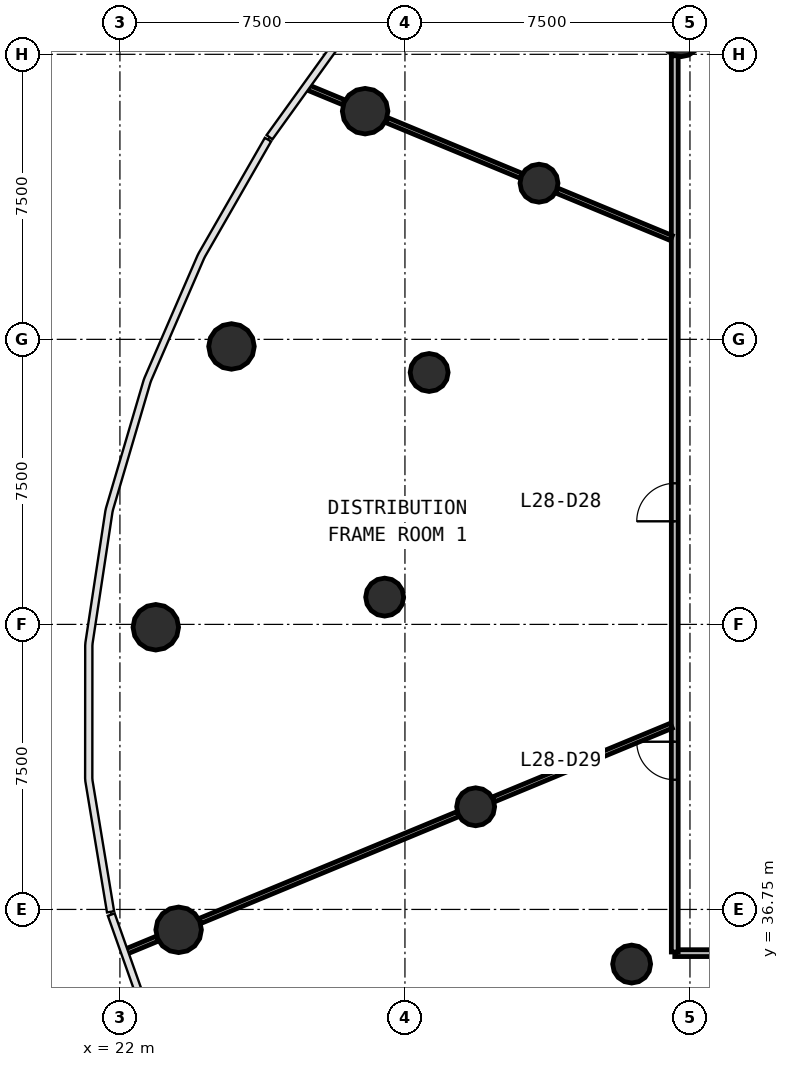
"""IFC4 building model, lengths in metres.
Left out: names, types, materials, properties, quantities, classifications, styles, units other than length and angle.
Written with IfcOpenShell. Run it as: python <this file> out.ifc"""

import sys

from ifc_helpers import new_model, si_unit, direction, frame, frame_2d, origin, origin_2d, place, context, subcontext, project, spatial, rectangle, circle, extrude, source, transform, mapped, element, fill, save


model = new_model("IFC4")
c1 = context("Model", 3, precision=1e-05, world=origin(), true_north=direction((0.0, 1.0)))
c2 = subcontext(c1, "Body", "Model", "MODEL_VIEW")
j1 = project(units=[si_unit("LENGTHUNIT", "METRE"), si_unit("PLANEANGLEUNIT", "RADIAN")], contexts=[c1])
p1 = place(None, origin())
s1 = spatial("IfcSite", under=j1, at=p1, CompositionType="ELEMENT")
p2 = place(p1, origin())
s2 = spatial("IfcBuilding", under=s1, at=p2, CompositionType="ELEMENT")
p3 = place(p2, frame((0.0, 0.0, 120.8)))
s3 = spatial("IfcBuildingStorey", under=s2, at=p3, CompositionType="ELEMENT", Elevation=120.8)
m1 = source(origin(), c2, "Body", "SweptSolid", [
    extrude(circle(Radius=0.6, at=origin_2d()), origin(), (0.0, 0.0, 1.0), 4.1),
])
for number, where, z_axis, x_axis in (
    (1, (28.452, 57.754, 0.0), (0.0, 0.0, 1.0), (1.0, 0.0, 0.0)),
    (2, (24.936, 51.563, 0.0), (0.0, 0.0, 1.0), (1.0, 0.0, 0.0)),
    (3, (22.944, 44.175, 0.0), (0.0, 0.0, 1.0), (1.0, 0.0, 0.0)),
    (4, (23.544, 36.213, 0.0), (0.0, 0.0, 1.0), (1.0, 0.0, 0.0)),
):
    element("IfcColumn", number, at=place(p3, frame(where, z_axis=z_axis, x_axis=x_axis)), inside=s3, PredefinedType="COLUMN", context=c2, shape_type="MappedRepresentation", body=[
        mapped(m1, transform((0.0, 0.0, 0.0), scale=1.0)),
    ])
m2 = source(origin(), c2, "Body", "SweptSolid", [
    extrude(circle(Radius=0.5, at=origin_2d()), origin(), (0.0, 0.0, 1.0), 4.1),
])
for number, where, z_axis, x_axis in (
    (5, (36.768, 59.688, 0.0), (0.0, 0.0, 1.0), (1.0, 0.0, 0.0)),
    (6, (33.028, 55.859, 0.0), (0.0, 0.0, 1.0), (1.0, 0.0, 0.0)),
    (7, (30.137, 50.878, 0.0), (0.0, 0.0, 1.0), (1.0, 0.0, 0.0)),
    (8, (28.966, 44.968, 0.0), (0.0, 0.0, 1.0), (1.0, 0.0, 0.0)),
    (9, (31.361, 39.451, 0.0), (0.0, 0.0, 1.0), (1.0, 0.0, 0.0)),
    (10, (35.465, 35.312, 0.0), (0.0, 0.0, 1.0), (1.0, 0.0, 0.0)),
):
    element("IfcColumn", number, at=place(p3, frame(where, z_axis=z_axis, x_axis=x_axis)), inside=s3, PredefinedType="COLUMN", context=c2, shape_type="MappedRepresentation", body=[
        mapped(m2, transform((0.0, 0.0, 0.0), scale=1.0)),
    ])
p4 = place(p3, frame((67.4, 35.6, 0.0), z_axis=(0.0, 0.0, 1.0), x_axis=(-1.0, 0.0, 0.0)))
e11 = element("IfcWall", 11, at=p4, inside=s3, PredefinedType="PARTITIONING", context=c2, shape_type="SweptSolid", body=[
    extrude(rectangle(XDim=30.8, YDim=0.18, at=frame_2d((15.4, 0.0))), origin(), (0.0, 0.0, 1.0), 2.9),
])
p5 = place(p4, frame((20.95, 0.0, 0.0)))
e12 = element("IfcOpeningElement", 12, at=p5, cuts=e11, PredefinedType="OPENING", context=c2, shape_type="SweptSolid", body=[
    extrude(rectangle(XDim=1.0, YDim=2.1, at=frame_2d((0.5, 1.05))), frame((0.0, 0.1, 0.0), z_axis=(0.0, -1.0, 0.0), x_axis=(1.0, 0.0, 0.0)), (0.0, 0.0, 1.0), 0.2),
])
p6 = place(p4, frame((14.95, 0.0, 0.0)))
e13 = element("IfcOpeningElement", 13, at=p6, cuts=e11, PredefinedType="OPENING", context=c2, shape_type="SweptSolid", body=[
    extrude(rectangle(XDim=1.0, YDim=2.1, at=frame_2d((0.5, 1.05))), frame((0.0, 0.1, 0.0), z_axis=(0.0, -1.0, 0.0), x_axis=(1.0, 0.0, 0.0)), (0.0, 0.0, 1.0), 0.2),
])
p7 = place(p4, frame((12.55, 0.0, 0.0)))
e14 = element("IfcOpeningElement", 14, at=p7, cuts=e11, PredefinedType="OPENING", context=c2, shape_type="SweptSolid", body=[
    extrude(rectangle(XDim=1.0, YDim=2.1, at=frame_2d((0.5, 1.05))), frame((0.0, 0.1, 0.0), z_axis=(0.0, -1.0, 0.0), x_axis=(1.0, 0.0, 0.0)), (0.0, 0.0, 1.0), 0.2),
])
p8 = place(p3, frame((36.6, 35.63, 0.0), z_axis=(0.0, 0.0, 1.0), x_axis=(0.0, 1.0, 0.0)))
e15 = element("IfcWall", 15, at=p8, inside=s3, PredefinedType="PARTITIONING", context=c2, shape_type="SweptSolid", body=[
    extrude(rectangle(XDim=23.583, YDim=0.18, at=frame_2d((11.791, 0.0))), origin(), (0.0, 0.0, 1.0), 2.9),
])
p9 = place(p8, frame((11.333, 0.0, 0.0)))
e16 = element("IfcOpeningElement", 16, at=p9, cuts=e15, PredefinedType="OPENING", context=c2, shape_type="SweptSolid", body=[
    extrude(rectangle(XDim=1.0, YDim=2.1, at=frame_2d((0.5, 1.05))), frame((0.0, 0.1, 0.0), z_axis=(0.0, -1.0, 0.0), x_axis=(1.0, 0.0, 0.0)), (0.0, 0.0, 1.0), 0.2),
])
p10 = place(p8, frame((4.532, 0.0, 0.0)))
e17 = element("IfcOpeningElement", 17, at=p10, cuts=e15, PredefinedType="OPENING", context=c2, shape_type="SweptSolid", body=[
    extrude(rectangle(XDim=1.0, YDim=2.1, at=frame_2d((0.5, 1.05))), frame((0.0, 0.1, 0.0), z_axis=(0.0, -1.0, 0.0), x_axis=(1.0, 0.0, 0.0)), (0.0, 0.0, 1.0), 0.2),
])
p11 = place(p3, frame((30.894, 39.258, 0.0), z_axis=(0.0, 0.0, 1.0), x_axis=(-0.923867037115, -0.382713597528, 0.0)))
e18 = element("IfcWall", 18, at=p11, inside=s3, PredefinedType="PARTITIONING", context=c2, shape_type="SweptSolid", body=[
    extrude(rectangle(XDim=7.35, YDim=0.14, at=frame_2d((3.675, 0.0))), origin(), (0.0, 0.0, 1.0), 2.9),
])
p12 = place(p3, frame((36.51, 41.584, 0.0), z_axis=(0.0, 0.0, 1.0), x_axis=(-0.923890025086, -0.382658100067, 0.0)))
e19 = element("IfcWall", 19, at=p12, inside=s3, PredefinedType="PARTITIONING", context=c2, shape_type="SweptSolid", body=[
    extrude(rectangle(XDim=5.068, YDim=0.14, at=frame_2d((2.534, 0.0))), origin(), (0.0, 0.0, 1.0), 2.9),
])
p13 = place(p3, frame((32.561, 56.052, 0.0), z_axis=(0.0, 0.0, 1.0), x_axis=(-0.923885171168, 0.38266981916, 0.0)))
e20 = element("IfcWall", 20, at=p13, inside=s3, PredefinedType="PARTITIONING", context=c2, shape_type="SweptSolid", body=[
    extrude(rectangle(XDim=3.842, YDim=0.14, at=frame_2d((1.921, 0.0))), origin(), (0.0, 0.0, 1.0), 2.9),
])
p14 = place(p3, frame((36.51, 54.416, 0.0), z_axis=(0.0, 0.0, 1.0), x_axis=(-0.923911109142, 0.382607190737, 0.0)))
e21 = element("IfcWall", 21, at=p14, inside=s3, PredefinedType="PARTITIONING", context=c2, shape_type="SweptSolid", body=[
    extrude(rectangle(XDim=3.264, YDim=0.14, at=frame_2d((1.632, 0.0))), origin(), (0.0, 0.0, 1.0), 2.9),
])
p15 = place(p3, frame((27.893, 57.985, 0.0), z_axis=(0.0, 0.0, 1.0), x_axis=(-0.92388760878, 0.382663933945, 0.0)))
e22 = element("IfcWall", 22, at=p15, inside=s3, PredefinedType="PARTITIONING", context=c2, shape_type="SweptSolid", body=[
    extrude(rectangle(XDim=1.013, YDim=0.14, at=frame_2d((0.507, 0.0))), origin(), (0.0, 0.0, 1.0), 2.9),
])
p16 = place(p3, frame((22.986, 35.982, 0.0), z_axis=(0.0, 0.0, 1.0), x_axis=(-0.923950055321, -0.38251313085, 0.0)))
e23 = element("IfcWall", 23, at=p16, inside=s3, PredefinedType="PARTITIONING", context=c2, shape_type="SweptSolid", body=[
    extrude(rectangle(XDim=0.891, YDim=0.14, at=frame_2d((0.446, 0.0))), origin(), (0.0, 0.0, 1.0), 2.9),
])
m3 = source(origin(), c2, "Body", "SweptSolid", [
    extrude(rectangle(XDim=1.0, YDim=2.1, at=frame_2d((0.5, 1.05))), frame((0.0, 0.025, 0.0), z_axis=(0.0, -1.0, 0.0), x_axis=(1.0, 0.0, 0.0)), (0.0, 0.0, 1.0), 0.05),
])
p17 = place(p9, origin())
e24 = element("IfcDoor", 24, at=p17, inside=s3, OperationType="SINGLE_SWING_LEFT", PredefinedType="DOOR", context=c2, shape_type="MappedRepresentation", body=[
    mapped(m3, transform((0.0, 0.0, 0.0), scale=1.0)),
])
fill(e16, e24)
p18 = place(p10, origin())
e25 = element("IfcDoor", 25, at=p18, inside=s3, OperationType="SINGLE_SWING_RIGHT", PredefinedType="DOOR", context=c2, shape_type="MappedRepresentation", body=[
    mapped(m3, transform((0.0, 0.0, 0.0), scale=1.0)),
])
fill(e17, e25)
save(model, sys.argv[1])
